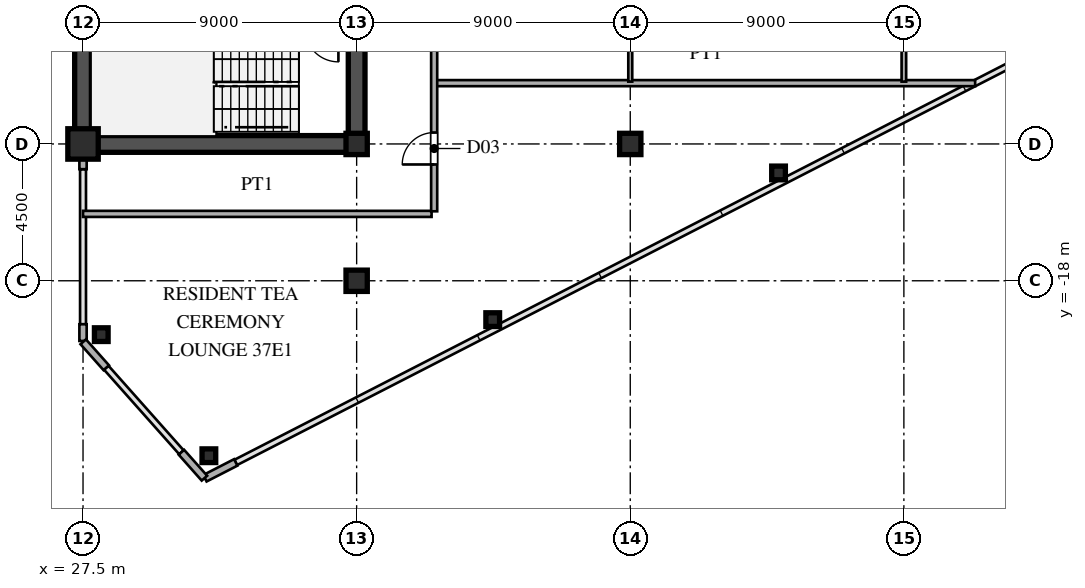
"""IFC4 building model, lengths in metres.
Left out: names, types, materials, properties, quantities, classifications, styles, units other than length and angle.
Written with IfcOpenShell. Run it as: python <this file> out.ifc"""

import sys

from ifc_helpers import new_model, si_unit, direction, frame, frame_2d, origin, origin_2d, place, context, subcontext, project, spatial, rectangle, hollow_rectangle, i_section, extrude, source, transform, mapped, element, fill, save


model = new_model("IFC4")
c1 = context("Model", 3, precision=1e-05, world=origin(), true_north=direction((0.0, 1.0)))
c2 = subcontext(c1, "Body", "Model", "MODEL_VIEW")
j1 = project(units=[si_unit("LENGTHUNIT", "METRE"), si_unit("PLANEANGLEUNIT", "RADIAN")], contexts=[c1])
p1 = place(None, origin())
s1 = spatial("IfcSite", under=j1, at=p1, CompositionType="ELEMENT")
p2 = place(p1, origin())
s2 = spatial("IfcBuilding", under=s1, at=p2, CompositionType="ELEMENT")
p3 = place(p2, frame((0.0, 0.0, 140.4)))
s3 = spatial("IfcBuildingStorey", under=s2, at=p3, CompositionType="ELEMENT", Elevation=140.4)
m1 = source(origin(), c2, "Body", "SweptSolid", [
    extrude(hollow_rectangle(XDim=1.0, YDim=1.0, WallThickness=0.042, at=origin_2d()), origin(), (0.0, 0.0, 1.0), 3.6),
])
p4 = place(p3, frame((27.5, -13.5, 0.0), z_axis=(0.0, 0.0, 1.0), x_axis=(1.0, 0.0, 0.0)))
e1 = element("IfcColumn", 1, at=p4, inside=s3, PredefinedType="COLUMN", context=c2, shape_type="MappedRepresentation", body=[
    mapped(m1, transform((0.0, 0.0, 0.0), scale=1.0)),
])
m2 = source(origin(), c2, "Body", "SweptSolid", [
    extrude(i_section(OverallWidth=0.7, OverallDepth=0.7, WebThickness=0.028, FlangeThickness=0.045, at=origin_2d()), origin(), (0.0, 0.0, 1.0), 3.6),
])
for number, where, z_axis, x_axis in (
    (2, (36.5, -18.0, 0.0), (0.0, 0.0, 1.0), (1.0, 0.0, 0.0)),
    (3, (36.5, -13.5, 0.0), (0.0, 0.0, 1.0), (1.0, 0.0, 0.0)),
    (4, (45.5, -13.5, 0.0), (0.0, 0.0, 1.0), (1.0, 0.0, 0.0)),
):
    element("IfcColumn", number, at=place(p3, frame(where, z_axis=z_axis, x_axis=x_axis)), inside=s3, PredefinedType="COLUMN", context=c2, shape_type="MappedRepresentation", body=[
        mapped(m2, transform((0.0, 0.0, 0.0), scale=1.0)),
    ])
m3 = source(origin(), c2, "Body", "SweptSolid", [
    extrude(hollow_rectangle(XDim=0.45, YDim=0.45, WallThickness=0.018, at=origin_2d()), origin(), (0.0, 0.0, 1.0), 3.6),
])
for number, where, z_axis, x_axis in (
    (5, (31.64, -23.754, 0.0), (0.0, 0.0, 1.0), (1.0, 0.0, 0.0)),
    (6, (28.1, -19.772, 0.0), (0.0, 0.0, 1.0), (1.0, 0.0, 0.0)),
    (7, (40.976, -19.278, 0.0), (0.0, 0.0, 1.0), (1.0, 0.0, 0.0)),
    (8, (50.377, -14.453, 0.0), (0.0, 0.0, 1.0), (1.0, 0.0, 0.0)),
):
    element("IfcColumn", number, at=place(p3, frame(where, z_axis=z_axis, x_axis=x_axis)), inside=s3, PredefinedType="COLUMN", context=c2, shape_type="MappedRepresentation", body=[
        mapped(m3, transform((0.0, 0.0, 0.0), scale=1.0)),
    ])
p5 = place(p3, frame((31.509, -24.495, 0.0), z_axis=(0.0, 0.0, 1.0), x_axis=(0.889797395748, 0.456355776255, 0.0)))
e9 = element("IfcWall", 9, at=p5, inside=s3, PredefinedType="SOLIDWALL", context=c2, shape_type="SweptSolid", body=[
    extrude(rectangle(XDim=1.14, YDim=0.24, at=frame_2d((0.57, 0.0))), origin(), (0.0, 0.0, 1.0), 3.38),
])
p6 = place(p3, frame((27.5, -19.98, 0.0), z_axis=(0.0, 0.0, 1.0), x_axis=(0.0, 1.0, 0.0)))
e10 = element("IfcWall", 10, at=p6, inside=s3, PredefinedType="SOLIDWALL", context=c2, shape_type="SweptSolid", body=[
    extrude(rectangle(XDim=0.55, YDim=0.24, at=frame_2d((0.275, 0.0))), origin(), (0.0, 0.0, 1.0), 3.38),
])
p7 = place(p3, frame((27.5, -14.33, 0.0), z_axis=(0.0, 0.0, 1.0), x_axis=(0.0, 1.0, 0.0)))
e11 = element("IfcWall", 11, at=p7, inside=s3, PredefinedType="SOLIDWALL", context=c2, shape_type="SweptSolid", body=[
    extrude(rectangle(XDim=0.55, YDim=0.24, at=frame_2d((0.275, 0.0))), origin(), (0.0, 0.0, 1.0), 2.88),
])
for number, where, z_axis, x_axis in (
    (12, (27.507, -20.008, 0.0), (0.0, 0.0, 1.0), (0.664, -0.747, 0.0)),
    (13, (30.736, -23.64, 0.0), (0.0, 0.0, 1.0), (0.664, -0.747, 0.0)),
):
    element("IfcWall", number, at=place(p3, frame(where, z_axis=z_axis, x_axis=x_axis)), inside=s3, PredefinedType="SOLIDWALL", context=c2, shape_type="SweptSolid", body=[
        extrude(rectangle(XDim=1.14, YDim=0.24, at=frame_2d((0.57, 0.0))), origin(), (0.0, 0.0, 1.0), 3.38),
    ])
p8 = place(p3, frame((27.5, -13.5, 0.0), z_axis=(0.0, 0.0, 1.0), x_axis=(0.0, 1.0, 0.0)))
e14 = element("IfcWall", 14, at=p8, inside=s3, PredefinedType="SHEAR", context=c2, shape_type="SweptSolid", body=[
    extrude(rectangle(XDim=12.2, YDim=0.55, at=frame_2d((6.1, 0.0))), origin(), (0.0, 0.0, 1.0), 3.38),
])
p9 = place(p3, frame((27.5, -13.5, 0.0), z_axis=(0.0, 0.0, 1.0), x_axis=(1.0, 0.0, 0.0)))
e15 = element("IfcWall", 15, at=p9, inside=s3, PredefinedType="SHEAR", context=c2, shape_type="SweptSolid", body=[
    extrude(rectangle(XDim=9.0, YDim=0.55, at=frame_2d((4.5, 0.0))), origin(), (0.0, 0.0, 1.0), 3.38),
])
p10 = place(p3, frame((36.5, -13.65, 0.0), z_axis=(0.0, 0.0, 1.0), x_axis=(0.0, 1.0, 0.0)))
e16 = element("IfcWall", 16, at=p10, inside=s3, PredefinedType="SHEAR", context=c2, shape_type="SweptSolid", body=[
    extrude(rectangle(XDim=7.15, YDim=0.55, at=frame_2d((3.575, 0.0))), origin(), (0.0, 0.0, 1.0), 3.38),
])
p11 = place(p10, frame((4.675, 0.0, 0.0)))
e17 = element("IfcOpeningElement", 17, at=p11, cuts=e16, PredefinedType="OPENING", context=c2, shape_type="SweptSolid", body=[
    extrude(rectangle(XDim=1.15, YDim=2.2, at=frame_2d((0.575, 1.1))), frame((0.0, 0.285, 0.0), z_axis=(0.0, -1.0, 0.0), x_axis=(1.0, 0.0, 0.0)), (0.0, 0.0, 1.0), 0.57),
])
p12 = place(p3, frame((27.5, -15.8, 0.0), z_axis=(0.0, 0.0, 1.0), x_axis=(1.0, 0.0, 0.0)))
e18 = element("IfcWall", 18, at=p12, inside=s3, PredefinedType="PARTITIONING", context=c2, shape_type="SweptSolid", body=[
    extrude(rectangle(XDim=11.465, YDim=0.2, at=frame_2d((5.732, 0.0))), origin(), (0.0, 0.0, 1.0), 3.38),
])
p13 = place(p3, frame((39.13, -11.5, 0.0), z_axis=(0.0, 0.0, 1.0), x_axis=(1.0, 0.0, 0.0)))
e19 = element("IfcWall", 19, at=p13, inside=s3, PredefinedType="PARTITIONING", context=c2, shape_type="SweptSolid", body=[
    extrude(rectangle(XDim=17.714, YDim=0.2, at=frame_2d((8.857, 0.0))), origin(), (0.0, 0.0, 1.0), 3.38),
])
p14 = place(p3, frame((39.05, -15.715, 0.0), z_axis=(0.0, 0.0, 1.0), x_axis=(0.0, 1.0, 0.0)))
e20 = element("IfcWall", 20, at=p14, inside=s3, PredefinedType="PARTITIONING", context=c2, shape_type="SweptSolid", body=[
    extrude(rectangle(XDim=31.43, YDim=0.2, at=frame_2d((15.715, 0.0))), origin(), (0.0, 0.0, 1.0), 3.38),
])
p15 = place(p14, frame((1.54, 0.0, 0.0)))
e21 = element("IfcOpeningElement", 21, at=p15, cuts=e20, PredefinedType="OPENING", context=c2, shape_type="SweptSolid", body=[
    extrude(rectangle(XDim=1.05, YDim=2.25, at=frame_2d((0.525, 1.125))), frame((0.0, 0.11, 0.0), z_axis=(0.0, -1.0, 0.0), x_axis=(1.0, 0.0, 0.0)), (0.0, 0.0, 1.0), 0.22),
])
p16 = place(p14, frame((8.782, 0.0, 0.0)))
e22 = element("IfcOpeningElement", 22, at=p16, cuts=e20, PredefinedType="OPENING", context=c2, shape_type="SweptSolid", body=[
    extrude(rectangle(XDim=1.05, YDim=2.25, at=frame_2d((0.525, 1.125))), frame((0.0, 0.11, 0.0), z_axis=(0.0, -1.0, 0.0), x_axis=(1.0, 0.0, 0.0)), (0.0, 0.0, 1.0), 0.22),
])
p17 = place(p14, frame((19.282, 0.0, 0.0)))
e23 = element("IfcOpeningElement", 23, at=p17, cuts=e20, PredefinedType="OPENING", context=c2, shape_type="SweptSolid", body=[
    extrude(rectangle(XDim=1.05, YDim=2.25, at=frame_2d((0.525, 1.125))), frame((0.0, 0.11, 0.0), z_axis=(0.0, -1.0, 0.0), x_axis=(1.0, 0.0, 0.0)), (0.0, 0.0, 1.0), 0.22),
])
p18 = place(p14, frame((27.84, 0.0, 0.0)))
e24 = element("IfcOpeningElement", 24, at=p18, cuts=e20, PredefinedType="OPENING", context=c2, shape_type="SweptSolid", body=[
    extrude(rectangle(XDim=1.05, YDim=2.25, at=frame_2d((0.525, 1.125))), frame((0.0, 0.11, 0.0), z_axis=(0.0, -1.0, 0.0), x_axis=(1.0, 0.0, 0.0)), (0.0, 0.0, 1.0), 0.22),
])
p19 = place(p3, frame((45.5, -11.45, 0.0), z_axis=(0.0, 0.0, 1.0), x_axis=(0.0, 1.0, 0.0)))
e25 = element("IfcWall", 25, at=p19, inside=s3, PredefinedType="PARTITIONING", context=c2, shape_type="SweptSolid", body=[
    extrude(rectangle(XDim=2.733, YDim=0.13, at=frame_2d((1.366, 0.0))), origin(), (0.0, 0.0, 1.0), 2.78),
])
p20 = place(p3, frame((54.5, -11.45, 0.0), z_axis=(0.0, 0.0, 1.0), x_axis=(0.0, 1.0, 0.0)))
e26 = element("IfcWall", 26, at=p20, inside=s3, PredefinedType="PARTITIONING", context=c2, shape_type="SweptSolid", body=[
    extrude(rectangle(XDim=20.9, YDim=0.15, at=frame_2d((10.45, 0.0))), origin(), (0.0, 0.0, 1.0), 2.78),
])
p21 = place(p20, frame((4.725, 0.0, 0.0)))
e27 = element("IfcOpeningElement", 27, at=p21, cuts=e26, PredefinedType="OPENING", context=c2, shape_type="SweptSolid", body=[
    extrude(rectangle(XDim=0.95, YDim=2.15, at=frame_2d((0.475, 1.075))), frame((0.0, 0.085, 0.0), z_axis=(0.0, -1.0, 0.0), x_axis=(1.0, 0.0, 0.0)), (0.0, 0.0, 1.0), 0.17),
])
p22 = place(p20, frame((1.225, 0.0, 0.0)))
e28 = element("IfcOpeningElement", 28, at=p22, cuts=e26, PredefinedType="OPENING", context=c2, shape_type="SweptSolid", body=[
    extrude(rectangle(XDim=0.95, YDim=2.15, at=frame_2d((0.475, 1.075))), frame((0.0, 0.085, 0.0), z_axis=(0.0, -1.0, 0.0), x_axis=(1.0, 0.0, 0.0)), (0.0, 0.0, 1.0), 0.17),
])
p23 = place(p20, frame((8.225, 0.0, 0.0)))
e29 = element("IfcOpeningElement", 29, at=p23, cuts=e26, PredefinedType="OPENING", context=c2, shape_type="SweptSolid", body=[
    extrude(rectangle(XDim=0.95, YDim=2.15, at=frame_2d((0.475, 1.075))), frame((0.0, 0.085, 0.0), z_axis=(0.0, -1.0, 0.0), x_axis=(1.0, 0.0, 0.0)), (0.0, 0.0, 1.0), 0.17),
])
p24 = place(p20, frame((14.552, 0.0, 0.0)))
e30 = element("IfcOpeningElement", 30, at=p24, cuts=e26, PredefinedType="OPENING", context=c2, shape_type="SweptSolid", body=[
    extrude(rectangle(XDim=0.95, YDim=2.15, at=frame_2d((0.475, 1.075))), frame((0.0, 0.085, 0.0), z_axis=(0.0, -1.0, 0.0), x_axis=(1.0, 0.0, 0.0)), (0.0, 0.0, 1.0), 0.17),
])
m4 = source(origin(), c2, "Body", "SweptSolid", [
    extrude(rectangle(XDim=1.05, YDim=2.25, at=frame_2d((0.525, 1.125))), frame((0.0, 0.025, 0.0), z_axis=(0.0, -1.0, 0.0), x_axis=(1.0, 0.0, 0.0)), (0.0, 0.0, 1.0), 0.05),
])
p25 = place(p15, origin())
e31 = element("IfcDoor", 31, at=p25, inside=s3, OperationType="SINGLE_SWING_LEFT", PredefinedType="DOOR", context=c2, shape_type="MappedRepresentation", body=[
    mapped(m4, transform((0.0, 0.0, 0.0), scale=1.0)),
])
fill(e21, e31)
save(model, sys.argv[1])
